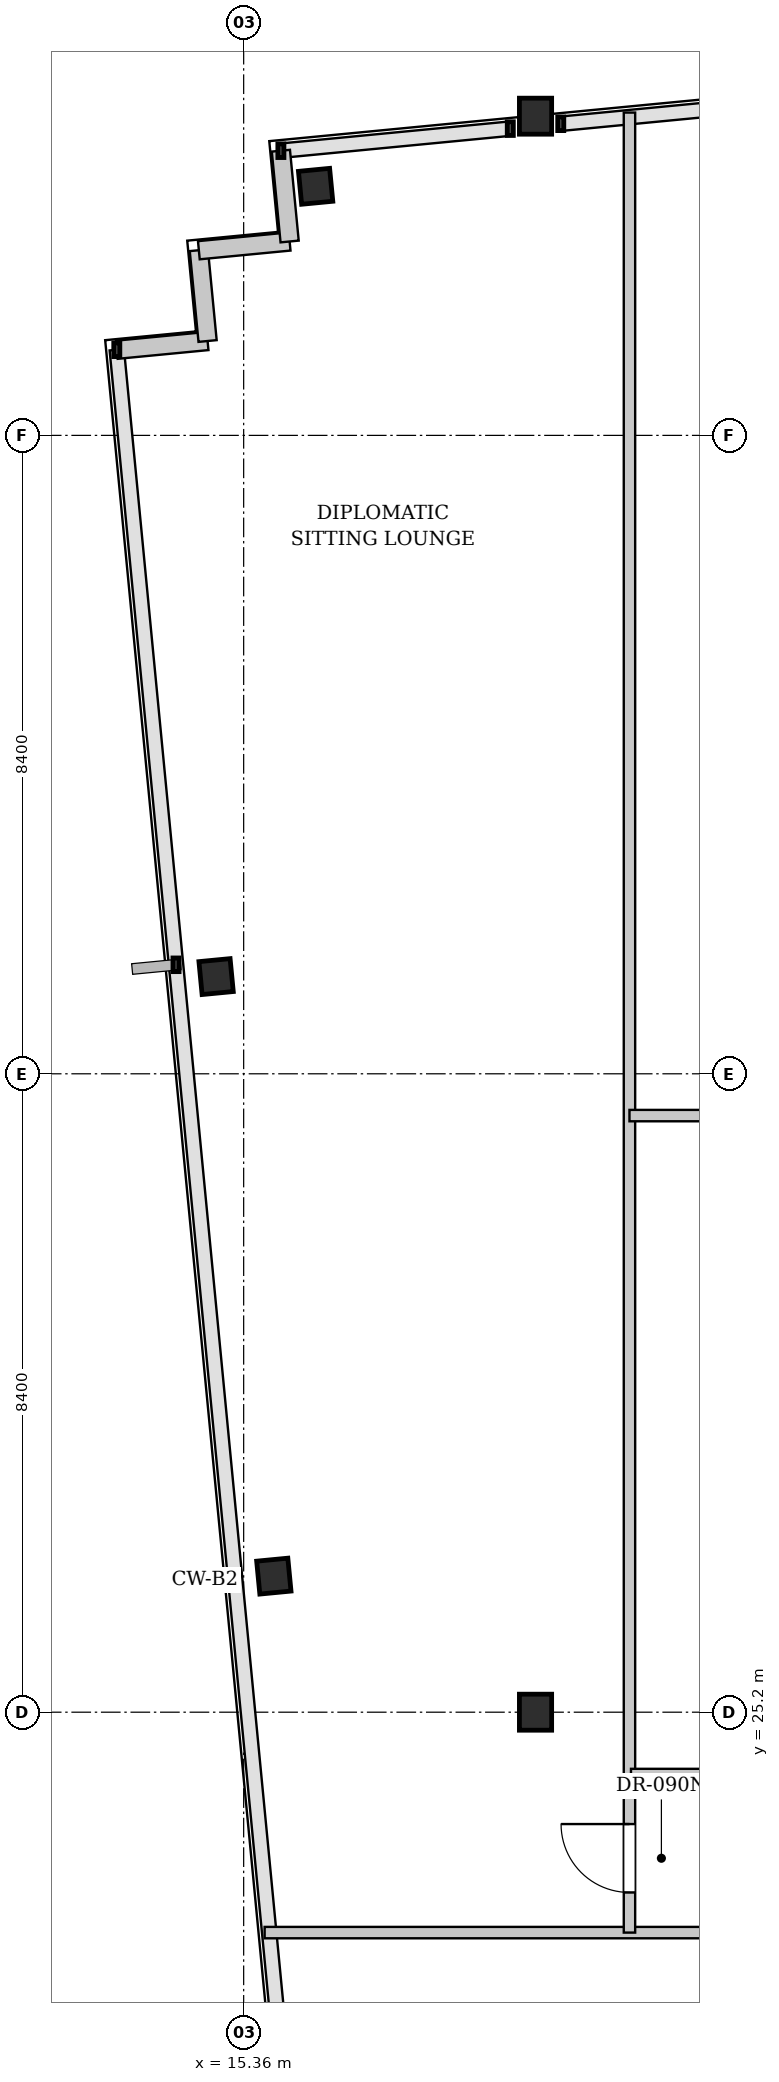
"""IFC4 building model, lengths in metres.
Left out: names, types, materials, properties, quantities, classifications, styles, units other than length and angle.
Written with IfcOpenShell. Run it as: python <this file> out.ifc"""

import sys

from ifc_helpers import new_model, si_unit, direction, frame, frame_2d, origin, origin_2d, place, context, subcontext, project, spatial, rectangle, i_section, extrude, element, fill, save


model = new_model("IFC4")
c1 = context("Model", 3, precision=1e-05, world=origin(), true_north=direction((0.0, 1.0)))
c2 = subcontext(c1, "Body", "Model", "MODEL_VIEW")
j1 = project(units=[si_unit("LENGTHUNIT", "METRE"), si_unit("PLANEANGLEUNIT", "RADIAN")], contexts=[c1])
p1 = place(None, origin())
s1 = spatial("IfcSite", under=j1, at=p1, CompositionType="ELEMENT")
p2 = place(p1, origin())
s2 = spatial("IfcBuilding", under=s1, at=p2, CompositionType="ELEMENT")
p3 = place(p2, frame((0.0, 0.0, 96.5)))
s3 = spatial("IfcBuildingStorey", under=s2, at=p3, CompositionType="ELEMENT", Elevation=96.5)
for number, where, z_axis, x_axis in (
    (1, (19.2, 25.2, 0.0), (0.0, 0.0, 1.0), (1.0, 0.0, 0.0)),
    (2, (19.2, 46.2, 0.0), (0.0, 0.0, 1.0), (1.0, 0.0, 0.0)),
):
    element("IfcColumn", number, at=place(p3, frame(where, z_axis=z_axis, x_axis=x_axis)), inside=s3, PredefinedType="COLUMN", context=c2, shape_type="SweptSolid", body=[
        extrude(i_section(OverallWidth=0.424, OverallDepth=0.474, WebThickness=0.047, FlangeThickness=0.077, FilletRadius=0.015, at=origin_2d()), origin(), (0.0, 0.0, 1.0), 3.4),
    ])
for number, where, z_axis, x_axis in (
    (3, (16.307, 45.277, 0.0), (0.0, 0.0, 1.0), (0.995, 0.096, 0.0)),
    (4, (15.757, 26.99, 0.0), (0.0, 0.0, 1.0), (0.995, 0.096, 0.0)),
    (5, (14.997, 34.879, 0.0), (0.0, 0.0, 1.0), (0.995, 0.096, 0.0)),
):
    element("IfcColumn", number, at=place(p3, frame(where, z_axis=z_axis, x_axis=x_axis)), inside=s3, PredefinedType="COLUMN", context=c2, shape_type="SweptSolid", body=[
        extrude(i_section(OverallWidth=0.412, OverallDepth=0.435, WebThickness=0.036, FlangeThickness=0.058, FilletRadius=0.015, at=origin_2d()), origin(), (0.0, 0.0, 1.0), 3.4),
    ])
for number, where, z_axis, x_axis in (
    (6, (13.691, 43.127, 0.0), (0.0, 0.0, 1.0), (0.995, 0.096, 0.0)),
    (7, (14.885, 43.242, 0.0), (0.0, 0.0, 1.0), (-0.096, 0.995, 0.0)),
):
    element("IfcWall", number, at=place(p3, frame(where, z_axis=z_axis, x_axis=x_axis)), inside=s3, PredefinedType="SOLIDWALL", context=c2, shape_type="SweptSolid", body=[
        extrude(rectangle(XDim=1.2, YDim=0.24, at=frame_2d((0.6, 0.0))), origin(), (0.0, 0.0, 1.0), 3.18),
    ])
for number, where, z_axis, x_axis in (
    (8, (14.771, 44.436, 0.0), (0.0, 0.0, 1.0), (0.995, 0.096, 0.0)),
    (9, (15.965, 44.551, 0.0), (0.0, 0.0, 1.0), (-0.096, 0.995, 0.0)),
):
    element("IfcWall", number, at=place(p3, frame(where, z_axis=z_axis, x_axis=x_axis)), inside=s3, PredefinedType="SOLIDWALL", context=c2, shape_type="SweptSolid", body=[
        extrude(rectangle(XDim=1.2, YDim=0.24, at=frame_2d((0.6, 0.0))), origin(), (0.0, 0.0, 1.0), 3.18),
    ])
p4 = place(p3, frame((15.636, 22.3, 0.0), z_axis=(0.0, 0.0, 1.0), x_axis=(1.0, 0.0, 0.0)))
e10 = element("IfcWall", 10, at=p4, inside=s3, PredefinedType="PARTITIONING", context=c2, shape_type="SweptSolid", body=[
    extrude(rectangle(XDim=61.222, YDim=0.15, at=frame_2d((30.611, 0.0))), origin(), (0.0, 0.0, 1.0), 3.18),
])
p5 = place(p4, frame((11.365, 0.0, 0.0)))
e11 = element("IfcOpeningElement", 11, at=p5, cuts=e10, PredefinedType="OPENING", context=c2, shape_type="SweptSolid", body=[
    extrude(rectangle(XDim=1.0, YDim=2.15, at=frame_2d((0.5, 1.075))), frame((0.0, 0.085, 0.0), z_axis=(0.0, -1.0, 0.0), x_axis=(1.0, 0.0, 0.0)), (0.0, 0.0, 1.0), 0.17),
])
p6 = place(p4, frame((23.917, 0.0, 0.0)))
e12 = element("IfcOpeningElement", 12, at=p6, cuts=e10, PredefinedType="OPENING", context=c2, shape_type="SweptSolid", body=[
    extrude(rectangle(XDim=1.0, YDim=2.15, at=frame_2d((0.5, 1.075))), frame((0.0, 0.085, 0.0), z_axis=(0.0, -1.0, 0.0), x_axis=(1.0, 0.0, 0.0)), (0.0, 0.0, 1.0), 0.17),
])
p7 = place(p4, frame((34.89, 0.0, 0.0)))
e13 = element("IfcOpeningElement", 13, at=p7, cuts=e10, PredefinedType="OPENING", context=c2, shape_type="SweptSolid", body=[
    extrude(rectangle(XDim=1.0, YDim=2.15, at=frame_2d((0.5, 1.075))), frame((0.0, 0.085, 0.0), z_axis=(0.0, -1.0, 0.0), x_axis=(1.0, 0.0, 0.0)), (0.0, 0.0, 1.0), 0.17),
])
p8 = place(p4, frame((47.15, 0.0, 0.0)))
e14 = element("IfcOpeningElement", 14, at=p8, cuts=e10, PredefinedType="OPENING", context=c2, shape_type="SweptSolid", body=[
    extrude(rectangle(XDim=1.0, YDim=2.15, at=frame_2d((0.5, 1.075))), frame((0.0, 0.085, 0.0), z_axis=(0.0, -1.0, 0.0), x_axis=(1.0, 0.0, 0.0)), (0.0, 0.0, 1.0), 0.17),
])
p9 = place(p3, frame((20.436, 22.3, 0.0), z_axis=(0.0, 0.0, 1.0), x_axis=(0.0, 1.0, 0.0)))
e15 = element("IfcWall", 15, at=p9, inside=s3, PredefinedType="PARTITIONING", context=c2, shape_type="SweptSolid", body=[
    extrude(rectangle(XDim=23.948, YDim=0.15, at=frame_2d((11.974, 0.0))), origin(), (0.0, 0.0, 1.0), 3.18),
])
p10 = place(p9, frame((0.528, 0.0, 0.0)))
e16 = element("IfcOpeningElement", 16, at=p10, cuts=e15, PredefinedType="OPENING", context=c2, shape_type="SweptSolid", body=[
    extrude(rectangle(XDim=0.9, YDim=2.15, at=frame_2d((0.45, 1.075))), frame((0.0, 0.085, 0.0), z_axis=(0.0, -1.0, 0.0), x_axis=(1.0, 0.0, 0.0)), (0.0, 0.0, 1.0), 0.17),
])
p11 = place(p3, frame((20.436, 33.05, 0.0), z_axis=(0.0, 0.0, 1.0), x_axis=(1.0, 0.0, 0.0)))
e17 = element("IfcWall", 17, at=p11, inside=s3, PredefinedType="PARTITIONING", context=c2, shape_type="SweptSolid", body=[
    extrude(rectangle(XDim=8.964, YDim=0.15, at=frame_2d((4.482, 0.0))), origin(), (0.0, 0.0, 1.0), 3.18),
])
p12 = place(p3, frame((20.456, 24.38, 0.0), z_axis=(0.0, 0.0, 1.0), x_axis=(1.0, 0.0, 0.0)))
e18 = element("IfcWall", 18, at=p12, inside=s3, PredefinedType="PARTITIONING", context=c2, shape_type="SweptSolid", body=[
    extrude(rectangle(XDim=8.934, YDim=0.15, at=frame_2d((4.467, 0.0))), origin(), (0.0, 0.0, 1.0), 3.18),
])
p13 = place(p12, frame((4.227, 0.0, 0.0)))
e19 = element("IfcOpeningElement", 19, at=p13, cuts=e18, PredefinedType="OPENING", context=c2, shape_type="SweptSolid", body=[
    extrude(rectangle(XDim=0.9, YDim=2.15, at=frame_2d((0.45, 1.075))), frame((0.0, 0.085, 0.0), z_axis=(0.0, -1.0, 0.0), x_axis=(1.0, 0.0, 0.0)), (0.0, 0.0, 1.0), 0.17),
])
p14 = place(p10, origin())
e20 = element("IfcDoor", 20, at=p14, inside=s3, OperationType="SINGLE_SWING_RIGHT", PredefinedType="DOOR", context=c2, shape_type="SweptSolid", body=[
    extrude(rectangle(XDim=0.9, YDim=2.15, at=frame_2d((0.45, 1.075))), frame((0.0, 0.025, 0.0), z_axis=(0.0, -1.0, 0.0), x_axis=(1.0, 0.0, 0.0)), (0.0, 0.0, 1.0), 0.05),
])
fill(e16, e20)
save(model, sys.argv[1])
